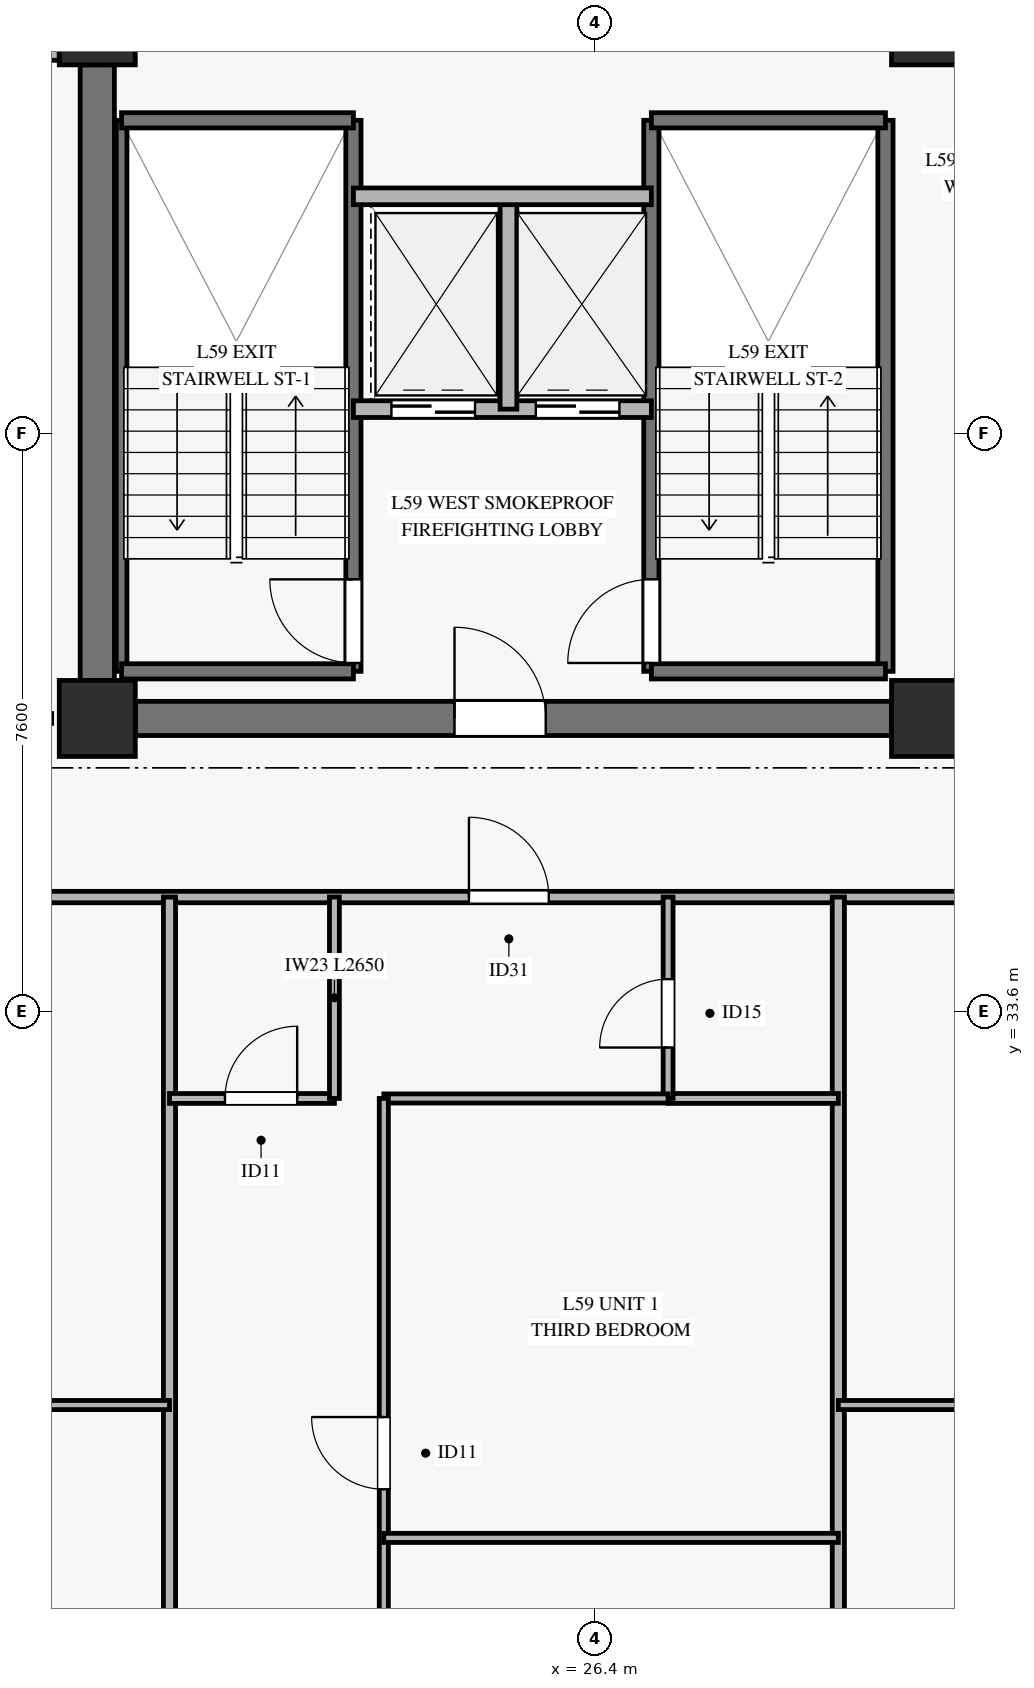
"""IFC4 building model, lengths in metres.
Left out: names, types, materials, properties, quantities, classifications, styles, units other than length and angle.
Written with IfcOpenShell. Run it as: python <this file> out.ifc"""

import sys

from ifc_helpers import new_model, si_unit, direction, frame, frame_2d, origin, origin_2d, place, context, subcontext, project, spatial, rectangle, extrude, source, transform, mapped, element, fill, save


model = new_model("IFC4")
c1 = context("Model", 3, precision=1e-05, world=origin(), true_north=direction((0.0, 1.0)))
c2 = subcontext(c1, "Body", "Model", "MODEL_VIEW")
j1 = project(units=[si_unit("LENGTHUNIT", "METRE"), si_unit("PLANEANGLEUNIT", "RADIAN")], contexts=[c1])
p1 = place(None, origin())
s1 = spatial("IfcSite", under=j1, at=p1, CompositionType="ELEMENT")
p2 = place(p1, origin())
s2 = spatial("IfcBuilding", under=s1, at=p2, CompositionType="ELEMENT")
p3 = place(p2, frame((0.0, 0.0, 233.8)))
s3 = spatial("IfcBuildingStorey", under=s2, at=p3, CompositionType="ELEMENT", Elevation=233.8)
m1 = source(origin(), c2, "Body", "SweptSolid", [
    extrude(rectangle(XDim=1.0, YDim=1.0, at=origin_2d()), origin(), (0.0, 0.0, 1.0), 3.12),
])
for number, where, z_axis, x_axis in (
    (1, (19.85, 37.45, 0.0), (0.0, 0.0, 1.0), (1.0, 0.0, 0.0)),
    (2, (19.85, 46.55, 0.0), (0.0, 0.0, 1.0), (1.0, 0.0, 0.0)),
    (3, (30.8, 37.45, 0.0), (0.0, 0.0, 1.0), (1.0, 0.0, 0.0)),
    (4, (30.8, 46.55, 0.0), (0.0, 0.0, 1.0), (1.0, 0.0, 0.0)),
):
    element("IfcColumn", number, at=place(p3, frame(where, z_axis=z_axis, x_axis=x_axis)), inside=s3, PredefinedType="PILASTER", context=c2, shape_type="MappedRepresentation", body=[
        mapped(m1, transform((0.0, 0.0, 0.0), x_axis=(1.0, 0.0, 0.0), y_axis=(0.0, 1.0, 0.0), z_axis=(0.0, 0.0, 1.0), scale=1.0)),
    ])
p4 = place(p3, frame((20.35, 37.45, 0.0), z_axis=(0.0, 0.0, 1.0), x_axis=(1.0, 0.0, 0.0)))
e5 = element("IfcWall", 5, at=p4, inside=s3, PredefinedType="SHEAR", context=c2, shape_type="SweptSolid", body=[
    extrude(rectangle(XDim=9.95, YDim=0.45, at=frame_2d((4.975, 0.0))), origin(), (0.0, 0.0, 1.0), 3.12),
])
p5 = place(p4, frame((4.2, 0.0, 0.0)))
e6 = element("IfcOpeningElement", 6, at=p5, cuts=e5, PredefinedType="OPENING", context=c2, shape_type="SweptSolid", body=[
    extrude(rectangle(XDim=1.2, YDim=2.15, at=frame_2d((0.6, 1.075))), frame((0.0, 0.235, 0.0), z_axis=(0.0, -1.0, 0.0), x_axis=(1.0, 0.0, 0.0)), (0.0, 0.0, 1.0), 0.47),
])
p6 = place(p3, frame((19.85, 37.95, 0.0), z_axis=(0.0, 0.0, 1.0), x_axis=(0.0, 1.0, 0.0)))
e7 = element("IfcWall", 7, at=p6, inside=s3, PredefinedType="SHEAR", context=c2, shape_type="SweptSolid", body=[
    extrude(rectangle(XDim=8.1, YDim=0.45, at=frame_2d((4.05, 0.0))), origin(), (0.0, 0.0, 1.0), 3.12),
])
p7 = place(p3, frame((10.54, 46.25, 0.0), z_axis=(0.0, 0.0, 1.0), x_axis=(1.0, 0.0, 0.0)))
e8 = element("IfcWall", 8, at=p7, inside=s3, PredefinedType="SOLIDWALL", context=c2, shape_type="SweptSolid", body=[
    extrude(rectangle(XDim=8.81, YDim=0.28, at=frame_2d((4.405, 0.0))), origin(), (0.0, 0.0, 1.0), 2.75),
])
p8 = place(p7, frame((3.605, 0.0, 0.45)))
e9 = element("IfcOpeningElement", 9, at=p8, cuts=e8, PredefinedType="OPENING", context=c2, shape_type="SweptSolid", body=[
    extrude(rectangle(XDim=1.6, YDim=2.0, at=frame_2d((0.8, 1.0))), frame((0.0, 0.15, 0.0), z_axis=(0.0, -1.0, 0.0), x_axis=(1.0, 0.0, 0.0)), (0.0, 0.0, 1.0), 0.3),
])
p9 = place(p3, frame((20.17, 38.07, 0.0), z_axis=(0.0, 0.0, 1.0), x_axis=(0.0, 1.0, 0.0)))
e10 = element("IfcWall", 10, at=p9, inside=s3, PredefinedType="SOLIDWALL", context=c2, shape_type="SweptSolid", body=[
    extrude(rectangle(XDim=7.25, YDim=0.14, at=frame_2d((3.625, 0.0))), origin(), (0.0, 0.0, 1.0), 3.4),
])
p10 = place(p3, frame((23.22, 38.07, 0.0), z_axis=(0.0, 0.0, 1.0), x_axis=(0.0, 1.0, 0.0)))
e11 = element("IfcWall", 11, at=p10, inside=s3, PredefinedType="SOLIDWALL", context=c2, shape_type="SweptSolid", body=[
    extrude(rectangle(XDim=7.25, YDim=0.2, at=frame_2d((3.625, 0.0))), origin(), (0.0, 0.0, 1.0), 3.4),
])
p11 = place(p10, frame((0.11, 0.0, 0.0)))
e12 = element("IfcOpeningElement", 12, at=p11, cuts=e11, PredefinedType="OPENING", context=c2, shape_type="SweptSolid", body=[
    extrude(rectangle(XDim=1.1, YDim=2.15, at=frame_2d((0.55, 1.075))), frame((0.0, 0.11, 0.0), z_axis=(0.0, -1.0, 0.0), x_axis=(1.0, 0.0, 0.0)), (0.0, 0.0, 1.0), 0.22),
])
for number, where, z_axis, x_axis in (
    (13, (20.17, 45.32, 0.0), (0.0, 0.0, 1.0), (1.0, 0.0, 0.0)),
    (14, (20.17, 38.07, 0.0), (0.0, 0.0, 1.0), (1.0, 0.0, 0.0)),
):
    element("IfcWall", number, at=place(p3, frame(where, z_axis=z_axis, x_axis=x_axis)), inside=s3, PredefinedType="SOLIDWALL", context=c2, shape_type="SweptSolid", body=[
        extrude(rectangle(XDim=3.05, YDim=0.2, at=frame_2d((1.525, 0.0))), origin(), (0.0, 0.0, 1.0), 3.4),
    ])
p12 = place(p3, frame((27.14, 38.07, 0.0), z_axis=(0.0, 0.0, 1.0), x_axis=(0.0, 1.0, 0.0)))
e15 = element("IfcWall", 15, at=p12, inside=s3, PredefinedType="SOLIDWALL", context=c2, shape_type="SweptSolid", body=[
    extrude(rectangle(XDim=7.25, YDim=0.2, at=frame_2d((3.625, 0.0))), origin(), (0.0, 0.0, 1.0), 3.4),
])
p13 = place(p12, frame((0.11, 0.0, 0.0)))
e16 = element("IfcOpeningElement", 16, at=p13, cuts=e15, PredefinedType="OPENING", context=c2, shape_type="SweptSolid", body=[
    extrude(rectangle(XDim=1.1, YDim=2.15, at=frame_2d((0.55, 1.075))), frame((0.0, 0.11, 0.0), z_axis=(0.0, -1.0, 0.0), x_axis=(1.0, 0.0, 0.0)), (0.0, 0.0, 1.0), 0.22),
])
p14 = place(p3, frame((30.22, 38.07, 0.0), z_axis=(0.0, 0.0, 1.0), x_axis=(0.0, 1.0, 0.0)))
e17 = element("IfcWall", 17, at=p14, inside=s3, PredefinedType="SOLIDWALL", context=c2, shape_type="SweptSolid", body=[
    extrude(rectangle(XDim=7.25, YDim=0.2, at=frame_2d((3.625, 0.0))), origin(), (0.0, 0.0, 1.0), 3.4),
])
for number, where, z_axis, x_axis in (
    (18, (27.14, 45.32, 0.0), (0.0, 0.0, 1.0), (1.0, 0.0, 0.0)),
    (19, (27.14, 38.07, 0.0), (0.0, 0.0, 1.0), (1.0, 0.0, 0.0)),
):
    element("IfcWall", number, at=place(p3, frame(where, z_axis=z_axis, x_axis=x_axis)), inside=s3, PredefinedType="SOLIDWALL", context=c2, shape_type="SweptSolid", body=[
        extrude(rectangle(XDim=3.08, YDim=0.2, at=frame_2d((1.54, 0.0))), origin(), (0.0, 0.0, 1.0), 3.4),
    ])
p15 = place(p3, frame((23.22, 41.52, 0.0), z_axis=(0.0, 0.0, 1.0), x_axis=(1.0, 0.0, 0.0)))
e20 = element("IfcWall", 20, at=p15, inside=s3, PredefinedType="SOLIDWALL", context=c2, shape_type="SweptSolid", body=[
    extrude(rectangle(XDim=3.92, YDim=0.22, at=frame_2d((1.96, 0.0))), origin(), (0.0, 0.0, 1.0), 3.12),
])
p16 = place(p15, frame((0.5, 0.0, 0.0)))
e21 = element("IfcOpeningElement", 21, at=p16, cuts=e20, PredefinedType="OPENING", context=c2, shape_type="SweptSolid", body=[
    extrude(rectangle(XDim=1.1, YDim=2.2, at=frame_2d((0.55, 1.1))), frame((0.0, 0.12, 0.0), z_axis=(0.0, -1.0, 0.0), x_axis=(1.0, 0.0, 0.0)), (0.0, 0.0, 1.0), 0.24),
])
p17 = place(p15, frame((2.4, 0.0, 0.0)))
e22 = element("IfcOpeningElement", 22, at=p17, cuts=e20, PredefinedType="OPENING", context=c2, shape_type="SweptSolid", body=[
    extrude(rectangle(XDim=1.1, YDim=2.2, at=frame_2d((0.55, 1.1))), frame((0.0, 0.12, 0.0), z_axis=(0.0, -1.0, 0.0), x_axis=(1.0, 0.0, 0.0)), (0.0, 0.0, 1.0), 0.24),
])
p18 = place(p3, frame((25.26, 41.52, 0.0), z_axis=(0.0, 0.0, 1.0), x_axis=(0.0, 1.0, 0.0)))
e23 = element("IfcWall", 23, at=p18, inside=s3, PredefinedType="SOLIDWALL", context=c2, shape_type="SweptSolid", body=[
    extrude(rectangle(XDim=2.8, YDim=0.22, at=frame_2d((1.4, 0.0))), origin(), (0.0, 0.0, 1.0), 3.12),
])
p19 = place(p3, frame((23.22, 44.32, 0.0), z_axis=(0.0, 0.0, 1.0), x_axis=(1.0, 0.0, 0.0)))
e24 = element("IfcWall", 24, at=p19, inside=s3, PredefinedType="SOLIDWALL", context=c2, shape_type="SweptSolid", body=[
    extrude(rectangle(XDim=3.92, YDim=0.22, at=frame_2d((1.96, 0.0))), origin(), (0.0, 0.0, 1.0), 3.12),
])
p20 = place(p3, frame((7.533, 35.1, 0.0), z_axis=(0.0, 0.0, 1.0), x_axis=(1.0, 0.0, 0.0)))
e25 = element("IfcWall", 25, at=p20, inside=s3, PredefinedType="PARTITIONING", context=c2, shape_type="SweptSolid", body=[
    extrude(rectangle(XDim=55.334, YDim=0.15, at=frame_2d((27.667, 0.0))), origin(), (0.0, 0.0, 1.0), 2.305),
])
p21 = place(p20, frame((5.592, 0.0, 0.0)))
e26 = element("IfcOpeningElement", 26, at=p21, cuts=e25, PredefinedType="OPENING", context=c2, shape_type="SweptSolid", body=[
    extrude(rectangle(XDim=1.05, YDim=2.15, at=frame_2d((0.525, 1.075))), frame((0.0, 0.085, 0.0), z_axis=(0.0, -1.0, 0.0), x_axis=(1.0, 0.0, 0.0)), (0.0, 0.0, 1.0), 0.17),
])
p22 = place(p20, frame((17.207, 0.0, 0.0)))
e27 = element("IfcOpeningElement", 27, at=p22, cuts=e25, PredefinedType="OPENING", context=c2, shape_type="SweptSolid", body=[
    extrude(rectangle(XDim=1.05, YDim=2.15, at=frame_2d((0.525, 1.075))), frame((0.0, 0.085, 0.0), z_axis=(0.0, -1.0, 0.0), x_axis=(1.0, 0.0, 0.0)), (0.0, 0.0, 1.0), 0.17),
])
p23 = place(p20, frame((25.884, 0.0, 0.0)))
e28 = element("IfcOpeningElement", 28, at=p23, cuts=e25, PredefinedType="OPENING", context=c2, shape_type="SweptSolid", body=[
    extrude(rectangle(XDim=1.05, YDim=2.15, at=frame_2d((0.525, 1.075))), frame((0.0, 0.085, 0.0), z_axis=(0.0, -1.0, 0.0), x_axis=(1.0, 0.0, 0.0)), (0.0, 0.0, 1.0), 0.17),
])
p24 = place(p20, frame((35.712, 0.0, 0.0)))
e29 = element("IfcOpeningElement", 29, at=p24, cuts=e25, PredefinedType="OPENING", context=c2, shape_type="SweptSolid", body=[
    extrude(rectangle(XDim=1.05, YDim=2.15, at=frame_2d((0.525, 1.075))), frame((0.0, 0.085, 0.0), z_axis=(0.0, -1.0, 0.0), x_axis=(1.0, 0.0, 0.0)), (0.0, 0.0, 1.0), 0.17),
])
p25 = place(p20, frame((46.92, 0.0, 0.0)))
e30 = element("IfcOpeningElement", 30, at=p25, cuts=e25, PredefinedType="OPENING", context=c2, shape_type="SweptSolid", body=[
    extrude(rectangle(XDim=1.05, YDim=2.15, at=frame_2d((0.525, 1.075))), frame((0.0, 0.085, 0.0), z_axis=(0.0, -1.0, 0.0), x_axis=(1.0, 0.0, 0.0)), (0.0, 0.0, 1.0), 0.17),
])
for number, where, z_axis, x_axis in (
    (31, (20.8, 13.25, 0.0), (0.0, 0.0, 1.0), (0.0, 1.0, 0.0)),
    (32, (29.6, 13.25, 0.0), (0.0, 0.0, 1.0), (0.0, 1.0, 0.0)),
):
    element("IfcWall", number, at=place(p3, frame(where, z_axis=z_axis, x_axis=x_axis)), inside=s3, PredefinedType="PARTITIONING", context=c2, shape_type="SweptSolid", body=[
        extrude(rectangle(XDim=21.85, YDim=0.16, at=frame_2d((10.925, 0.0))), origin(), (0.0, 0.0, 1.0), 2.705),
    ])
p26 = place(p3, frame((7.533, 28.416, 0.0), z_axis=(0.0, 0.0, 1.0), x_axis=(1.0, 0.0, 0.0)))
e33 = element("IfcWall", 33, at=p26, inside=s3, PredefinedType="PARTITIONING", context=c2, shape_type="SweptSolid", body=[
    extrude(rectangle(XDim=13.267, YDim=0.12, at=frame_2d((6.634, 0.0))), origin(), (0.0, 0.0, 1.0), 2.305),
])
p27 = place(p26, frame((5.842, 0.0, 0.0)))
e34 = element("IfcOpeningElement", 34, at=p27, cuts=e33, PredefinedType="OPENING", context=c2, shape_type="SweptSolid", body=[
    extrude(rectangle(XDim=0.95, YDim=2.1, at=frame_2d((0.475, 1.05))), frame((0.0, 0.07, 0.0), z_axis=(0.0, -1.0, 0.0), x_axis=(1.0, 0.0, 0.0)), (0.0, 0.0, 1.0), 0.14),
])
p28 = place(p3, frame((20.8, 32.45, 0.0), z_axis=(0.0, 0.0, 1.0), x_axis=(1.0, 0.0, 0.0)))
e35 = element("IfcWall", 35, at=p28, inside=s3, PredefinedType="PARTITIONING", context=c2, shape_type="SweptSolid", body=[
    extrude(rectangle(XDim=2.17, YDim=0.13, at=frame_2d((1.085, 0.0))), origin(), (0.0, 0.0, 1.0), 3.12),
])
p29 = place(p28, frame((0.73, 0.0, 0.0)))
e36 = element("IfcOpeningElement", 36, at=p29, cuts=e35, PredefinedType="OPENING", context=c2, shape_type="SweptSolid", body=[
    extrude(rectangle(XDim=0.95, YDim=2.1, at=frame_2d((0.475, 1.05))), frame((0.0, 0.075, 0.0), z_axis=(0.0, -1.0, 0.0), x_axis=(1.0, 0.0, 0.0)), (0.0, 0.0, 1.0), 0.15),
])
p30 = place(p3, frame((22.97, 32.45, 0.0), z_axis=(0.0, 0.0, 1.0), x_axis=(0.0, 1.0, 0.0)))
e37 = element("IfcWall", 37, at=p30, inside=s3, PredefinedType="PARTITIONING", context=c2, shape_type="SweptSolid", body=[
    extrude(rectangle(XDim=2.65, YDim=0.13, at=frame_2d((1.325, 0.0))), origin(), (0.0, 0.0, 1.0), 2.705),
])
p31 = place(p3, frame((27.36, 32.45, 0.0), z_axis=(0.0, 0.0, 1.0), x_axis=(1.0, 0.0, 0.0)))
e38 = element("IfcWall", 38, at=p31, inside=s3, PredefinedType="PARTITIONING", context=c2, shape_type="SweptSolid", body=[
    extrude(rectangle(XDim=2.24, YDim=0.13, at=frame_2d((1.12, 0.0))), origin(), (0.0, 0.0, 1.0), 3.12),
])
p32 = place(p3, frame((27.36, 32.45, 0.0), z_axis=(0.0, 0.0, 1.0), x_axis=(0.0, 1.0, 0.0)))
e39 = element("IfcWall", 39, at=p32, inside=s3, PredefinedType="PARTITIONING", context=c2, shape_type="SweptSolid", body=[
    extrude(rectangle(XDim=2.65, YDim=0.13, at=frame_2d((1.325, 0.0))), origin(), (0.0, 0.0, 1.0), 2.705),
])
p33 = place(p32, frame((0.67, 0.0, 0.0)))
e40 = element("IfcOpeningElement", 40, at=p33, cuts=e39, PredefinedType="OPENING", context=c2, shape_type="SweptSolid", body=[
    extrude(rectangle(XDim=0.9, YDim=2.1, at=frame_2d((0.45, 1.05))), frame((0.0, 0.075, 0.0), z_axis=(0.0, -1.0, 0.0), x_axis=(1.0, 0.0, 0.0)), (0.0, 0.0, 1.0), 0.15),
])
p34 = place(p3, frame((23.62, 32.45, 0.0), z_axis=(0.0, 0.0, 1.0), x_axis=(1.0, 0.0, 0.0)))
e41 = element("IfcWall", 41, at=p34, inside=s3, PredefinedType="PARTITIONING", context=c2, shape_type="SweptSolid", body=[
    extrude(rectangle(XDim=3.74, YDim=0.12, at=frame_2d((1.87, 0.0))), origin(), (0.0, 0.0, 1.0), 3.12),
])
p35 = place(p3, frame((23.62, 13.25, 0.0), z_axis=(0.0, 0.0, 1.0), x_axis=(0.0, 1.0, 0.0)))
e42 = element("IfcWall", 42, at=p35, inside=s3, PredefinedType="PARTITIONING", context=c2, shape_type="SweptSolid", body=[
    extrude(rectangle(XDim=19.2, YDim=0.12, at=frame_2d((9.6, 0.0))), origin(), (0.0, 0.0, 1.0), 2.705),
])
p36 = place(p35, frame((1.602, 0.0, 0.0)))
e43 = element("IfcOpeningElement", 43, at=p36, cuts=e42, PredefinedType="OPENING", context=c2, shape_type="SweptSolid", body=[
    extrude(rectangle(XDim=0.95, YDim=2.1, at=frame_2d((0.475, 1.05))), frame((0.0, 0.07, 0.0), z_axis=(0.0, -1.0, 0.0), x_axis=(1.0, 0.0, 0.0)), (0.0, 0.0, 1.0), 0.14),
])
p37 = place(p35, frame((8.276, 0.0, 0.0)))
e44 = element("IfcOpeningElement", 44, at=p37, cuts=e42, PredefinedType="OPENING", context=c2, shape_type="SweptSolid", body=[
    extrude(rectangle(XDim=0.95, YDim=2.1, at=frame_2d((0.475, 1.05))), frame((0.0, 0.07, 0.0), z_axis=(0.0, -1.0, 0.0), x_axis=(1.0, 0.0, 0.0)), (0.0, 0.0, 1.0), 0.14),
])
p38 = place(p35, frame((14.058, 0.0, 0.0)))
e45 = element("IfcOpeningElement", 45, at=p38, cuts=e42, PredefinedType="OPENING", context=c2, shape_type="SweptSolid", body=[
    extrude(rectangle(XDim=0.95, YDim=2.1, at=frame_2d((0.475, 1.05))), frame((0.0, 0.07, 0.0), z_axis=(0.0, -1.0, 0.0), x_axis=(1.0, 0.0, 0.0)), (0.0, 0.0, 1.0), 0.14),
])
p39 = place(p3, frame((23.62, 26.668, 0.0), z_axis=(0.0, 0.0, 1.0), x_axis=(1.0, 0.0, 0.0)))
e46 = element("IfcWall", 46, at=p39, inside=s3, PredefinedType="PARTITIONING", context=c2, shape_type="SweptSolid", body=[
    extrude(rectangle(XDim=5.98, YDim=0.12, at=frame_2d((2.99, 0.0))), origin(), (0.0, 0.0, 1.0), 3.12),
])
p40 = place(p3, frame((29.6, 28.416, 0.0), z_axis=(0.0, 0.0, 1.0), x_axis=(1.0, 0.0, 0.0)))
e47 = element("IfcWall", 47, at=p40, inside=s3, PredefinedType="PARTITIONING", context=c2, shape_type="SweptSolid", body=[
    extrude(rectangle(XDim=9.6, YDim=0.12, at=frame_2d((4.8, 0.0))), origin(), (0.0, 0.0, 1.0), 2.305),
])
p41 = place(p40, frame((4.006, 0.0, 0.0)))
e48 = element("IfcOpeningElement", 48, at=p41, cuts=e47, PredefinedType="OPENING", context=c2, shape_type="SweptSolid", body=[
    extrude(rectangle(XDim=0.95, YDim=2.1, at=frame_2d((0.475, 1.05))), frame((0.0, 0.07, 0.0), z_axis=(0.0, -1.0, 0.0), x_axis=(1.0, 0.0, 0.0)), (0.0, 0.0, 1.0), 0.14),
])
m2 = source(origin(), c2, "Body", "SweptSolid", [
    extrude(rectangle(XDim=1.1, YDim=2.15, at=frame_2d((0.55, 1.075))), frame((0.0, 0.025, 0.0), z_axis=(0.0, -1.0, 0.0), x_axis=(1.0, 0.0, 0.0)), (0.0, 0.0, 1.0), 0.05),
])
p42 = place(p11, origin())
e49 = element("IfcDoor", 49, at=p42, inside=s3, OperationType="SINGLE_SWING_RIGHT", PredefinedType="DOOR", context=c2, shape_type="MappedRepresentation", body=[
    mapped(m2, transform((0.0, 0.0, 0.0), x_axis=(1.0, 0.0, 0.0), y_axis=(0.0, 1.0, 0.0), z_axis=(0.0, 0.0, 1.0), scale=1.0)),
])
fill(e12, e49)
p43 = place(p13, origin())
e50 = element("IfcDoor", 50, at=p43, inside=s3, OperationType="SINGLE_SWING_LEFT", PredefinedType="DOOR", context=c2, shape_type="MappedRepresentation", body=[
    mapped(m2, transform((0.0, 0.0, 0.0), x_axis=(1.0, 0.0, 0.0), y_axis=(0.0, 1.0, 0.0), z_axis=(0.0, 0.0, 1.0), scale=1.0)),
])
fill(e16, e50)
m3 = source(origin(), c2, "Body", "SweptSolid", [
    extrude(rectangle(XDim=1.1, YDim=2.2, at=frame_2d((0.55, 1.1))), frame((0.0, 0.025, 0.0), z_axis=(0.0, -1.0, 0.0), x_axis=(1.0, 0.0, 0.0)), (0.0, 0.0, 1.0), 0.05),
])
p44 = place(p16, origin())
e51 = element("IfcDoor", 51, at=p44, inside=s3, OperationType="SLIDING_TO_LEFT", PredefinedType="DOOR", context=c2, shape_type="MappedRepresentation", body=[
    mapped(m3, transform((0.0, 0.0, 0.0), x_axis=(1.0, 0.0, 0.0), y_axis=(0.0, 1.0, 0.0), z_axis=(0.0, 0.0, 1.0), scale=1.0)),
])
fill(e21, e51)
p45 = place(p17, origin())
e52 = element("IfcDoor", 52, at=p45, inside=s3, OperationType="SLIDING_TO_LEFT", PredefinedType="DOOR", context=c2, shape_type="MappedRepresentation", body=[
    mapped(m3, transform((0.0, 0.0, 0.0), x_axis=(1.0, 0.0, 0.0), y_axis=(0.0, 1.0, 0.0), z_axis=(0.0, 0.0, 1.0), scale=1.0)),
])
fill(e22, e52)
m4 = source(origin(), c2, "Body", "SweptSolid", [
    extrude(rectangle(XDim=1.2, YDim=2.15, at=frame_2d((0.6, 1.075))), frame((0.0, 0.025, 0.0), z_axis=(0.0, -1.0, 0.0), x_axis=(1.0, 0.0, 0.0)), (0.0, 0.0, 1.0), 0.05),
])
p46 = place(p5, origin())
e53 = element("IfcDoor", 53, at=p46, inside=s3, OperationType="SINGLE_SWING_LEFT", PredefinedType="DOOR", context=c2, shape_type="MappedRepresentation", body=[
    mapped(m4, transform((0.0, 0.0, 0.0), x_axis=(1.0, 0.0, 0.0), y_axis=(0.0, 1.0, 0.0), z_axis=(0.0, 0.0, 1.0), scale=1.0)),
])
fill(e6, e53)
m5 = source(origin(), c2, "Body", "SweptSolid", [
    extrude(rectangle(XDim=1.05, YDim=2.15, at=frame_2d((0.525, 1.075))), frame((0.0, 0.025, 0.0), z_axis=(0.0, -1.0, 0.0), x_axis=(1.0, 0.0, 0.0)), (0.0, 0.0, 1.0), 0.05),
])
p47 = place(p22, origin())
e54 = element("IfcDoor", 54, at=p47, inside=s3, OperationType="SINGLE_SWING_LEFT", PredefinedType="DOOR", context=c2, shape_type="MappedRepresentation", body=[
    mapped(m5, transform((0.0, 0.0, 0.0), x_axis=(1.0, 0.0, 0.0), y_axis=(0.0, 1.0, 0.0), z_axis=(0.0, 0.0, 1.0), scale=1.0)),
])
fill(e27, e54)
m6 = source(origin(), c2, "Body", "SweptSolid", [
    extrude(rectangle(XDim=0.95, YDim=2.1, at=frame_2d((0.475, 1.05))), frame((0.0, 0.025, 0.0), z_axis=(0.0, -1.0, 0.0), x_axis=(1.0, 0.0, 0.0)), (0.0, 0.0, 1.0), 0.05),
])
p48 = place(p29, origin())
e55 = element("IfcDoor", 55, at=p48, inside=s3, OperationType="SINGLE_SWING_RIGHT", PredefinedType="DOOR", context=c2, shape_type="MappedRepresentation", body=[
    mapped(m6, transform((0.0, 0.0, 0.0), x_axis=(1.0, 0.0, 0.0), y_axis=(0.0, 1.0, 0.0), z_axis=(0.0, 0.0, 1.0), scale=1.0)),
])
fill(e36, e55)
m7 = source(origin(), c2, "Body", "SweptSolid", [
    extrude(rectangle(XDim=0.9, YDim=2.1, at=frame_2d((0.45, 1.05))), frame((0.0, 0.025, 0.0), z_axis=(0.0, -1.0, 0.0), x_axis=(1.0, 0.0, 0.0)), (0.0, 0.0, 1.0), 0.05),
])
p49 = place(p33, origin())
e56 = element("IfcDoor", 56, at=p49, inside=s3, OperationType="SINGLE_SWING_LEFT", PredefinedType="DOOR", context=c2, shape_type="MappedRepresentation", body=[
    mapped(m7, transform((0.0, 0.0, 0.0), x_axis=(1.0, 0.0, 0.0), y_axis=(0.0, 1.0, 0.0), z_axis=(0.0, 0.0, 1.0), scale=1.0)),
])
fill(e40, e56)
p50 = place(p38, origin())
e57 = element("IfcDoor", 57, at=p50, inside=s3, OperationType="SINGLE_SWING_RIGHT", PredefinedType="DOOR", context=c2, shape_type="MappedRepresentation", body=[
    mapped(m6, transform((0.0, 0.0, 0.0), x_axis=(1.0, 0.0, 0.0), y_axis=(0.0, 1.0, 0.0), z_axis=(0.0, 0.0, 1.0), scale=1.0)),
])
fill(e45, e57)
save(model, sys.argv[1])
